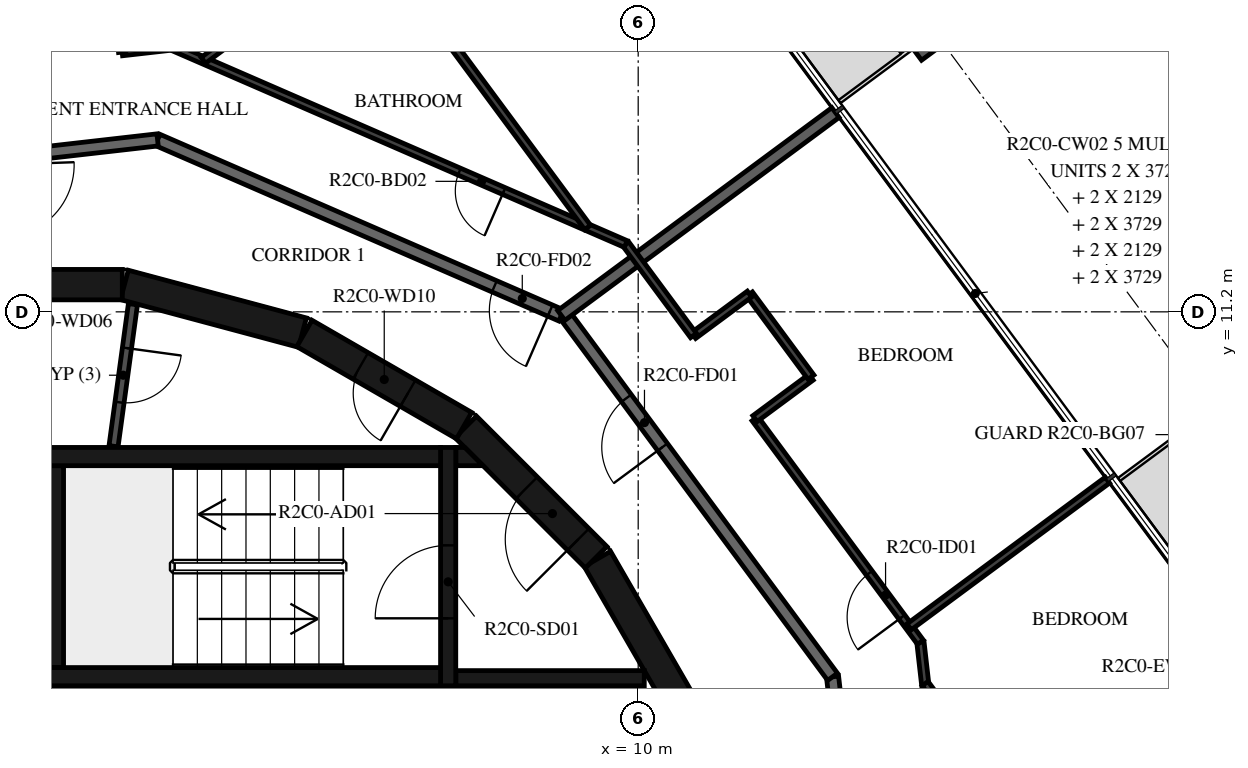
"""IFC4 building model, lengths in metres.
Left out: names, types, materials, properties, quantities, classifications, styles, units other than length and angle.
Written with IfcOpenShell. Run it as: python <this file> out.ifc"""

import sys

from ifc_helpers import new_model, si_unit, direction, frame, frame_2d, origin, origin_2d, place, context, subcontext, project, spatial, polyline, rectangle, i_section, outline, extrude, element, fill, save


model = new_model("IFC4")
c1 = context("Model", 3, precision=1e-05, world=origin(), true_north=direction((0.0, 1.0)))
c2 = subcontext(c1, "Body", "Model", "MODEL_VIEW")
j1 = project(units=[si_unit("LENGTHUNIT", "METRE"), si_unit("PLANEANGLEUNIT", "RADIAN")], contexts=[c1])
p1 = place(None, origin())
s1 = spatial("IfcSite", under=j1, at=p1, CompositionType="ELEMENT")
p2 = place(p1, origin())
s2 = spatial("IfcBuilding", under=s1, at=p2, CompositionType="ELEMENT")
p3 = place(p2, frame((0.0, 0.0, 104.7)))
s3 = spatial("IfcBuildingStorey", under=s2, at=p3, CompositionType="ELEMENT", Elevation=104.7)
p4 = place(p3, frame((14.932, 15.726, -0.38), z_axis=(0.0, 0.0, 1.0), x_axis=(0.594822857897, -0.803856807972, 0.0)))
e1 = element("IfcColumn", 1, at=p4, inside=s3, PredefinedType="COLUMN", context=c2, shape_type="SweptSolid", body=[
    extrude(i_section(OverallWidth=0.3, OverallDepth=0.9, WebThickness=0.019, FlangeThickness=0.035, FilletRadius=0.03, at=origin_2d()), origin(), (0.0, 0.0, 1.0), 2.616),
])
p5 = place(p3, frame((10.845, 4.51, 0.0), z_axis=(0.0, 0.0, 1.0), x_axis=(-0.500087131594, 0.865975092491, 0.0)))
e2 = element("IfcWall", 2, at=p5, inside=s3, PredefinedType="SHEAR", context=c2, shape_type="SweptSolid", body=[
    extrude(rectangle(XDim=3.033, YDim=0.5, at=frame_2d((1.516, 0.0))), origin(), (0.0, 0.0, 1.0), 3.05),
])
p6 = place(p3, frame((9.308, 7.164, 0.0), z_axis=(0.0, 0.0, 1.0), x_axis=(-0.707106781187, 0.707106781187, 0.0)))
e3 = element("IfcWall", 3, at=p6, inside=s3, PredefinedType="SHEAR", context=c2, shape_type="SweptSolid", body=[
    extrude(rectangle(XDim=3.032, YDim=0.5, at=frame_2d((1.516, 0.0))), origin(), (0.0, 0.0, 1.0), 3.05),
])
p7 = place(p6, frame((0.416, 0.0, 0.0)))
e4 = element("IfcOpeningElement", 4, at=p7, cuts=e3, PredefinedType="OPENING", context=c2, shape_type="SweptSolid", body=[
    extrude(rectangle(XDim=1.2, YDim=2.1, at=frame_2d((0.6, 1.05))), frame((0.0, 0.26, 0.0), z_axis=(0.0, -1.0, 0.0), x_axis=(1.0, 0.0, 0.0)), (0.0, 0.0, 1.0), 0.52),
])
p8 = place(p3, frame((7.137, 9.329, 0.0), z_axis=(0.0, 0.0, 1.0), x_axis=(-0.865975092491, 0.500087131594, 0.0)))
e5 = element("IfcWall", 5, at=p8, inside=s3, PredefinedType="SHEAR", context=c2, shape_type="SweptSolid", body=[
    extrude(rectangle(XDim=3.033, YDim=0.5, at=frame_2d((1.516, 0.0))), origin(), (0.0, 0.0, 1.0), 3.05),
])
p9 = place(p8, frame((1.066, 0.0, 0.0)))
e6 = element("IfcOpeningElement", 6, at=p9, cuts=e5, PredefinedType="OPENING", context=c2, shape_type="SweptSolid", body=[
    extrude(rectangle(XDim=0.9, YDim=2.1, at=frame_2d((0.45, 1.05))), frame((0.0, 0.26, 0.0), z_axis=(0.0, -1.0, 0.0), x_axis=(1.0, 0.0, 0.0)), (0.0, 0.0, 1.0), 0.52),
])
for number, where, z_axis, x_axis in (
    (7, (4.479, 10.858, 0.0), (0.0, 0.0, 1.0), (-0.966, 0.259, 0.0)),
    (8, (1.516, 11.647, 0.0), (0.0, 0.0, 1.0), (-1.0, 0.0, 0.0)),
):
    element("IfcWall", number, at=place(p3, frame(where, z_axis=z_axis, x_axis=x_axis)), inside=s3, PredefinedType="SHEAR", context=c2, shape_type="SweptSolid", body=[
        extrude(rectangle(XDim=3.033, YDim=0.5, at=frame_2d((1.516, 0.0))), origin(), (0.0, 0.0, 1.0), 3.05),
    ])
for number, where, z_axis, x_axis in (
    (9, (0.0, 5.2, 0.0), (0.0, 0.0, 1.0), (1.0, 0.0, 0.0)),
    (10, (0.0, 8.82, 0.0), (0.0, 0.0, 1.0), (1.0, 0.0, 0.0)),
):
    element("IfcWall", number, at=place(p3, frame(where, z_axis=z_axis, x_axis=x_axis)), inside=s3, PredefinedType="SHEAR", context=c2, shape_type="SweptSolid", body=[
        extrude(rectangle(XDim=6.75, YDim=0.3, at=frame_2d((3.375, 0.0))), origin(), (0.0, 0.0, 1.0), 3.05),
    ])
p10 = place(p3, frame((0.4, 5.35, 0.0), z_axis=(0.0, 0.0, 1.0), x_axis=(0.0, 1.0, 0.0)))
e11 = element("IfcWall", 11, at=p10, inside=s3, PredefinedType="SHEAR", context=c2, shape_type="SweptSolid", body=[
    extrude(rectangle(XDim=3.32, YDim=0.3, at=frame_2d((1.66, 0.0))), origin(), (0.0, 0.0, 1.0), 3.05),
])
p11 = place(p3, frame((6.875, 5.05, 0.0), z_axis=(0.0, 0.0, 1.0), x_axis=(0.0, 1.0, 0.0)))
e12 = element("IfcWall", 12, at=p11, inside=s3, PredefinedType="SHEAR", context=c2, shape_type="SweptSolid", body=[
    extrude(rectangle(XDim=3.92, YDim=0.25, at=frame_2d((1.96, 0.0))), origin(), (0.0, 0.0, 1.0), 3.05),
])
p12 = place(p11, frame((1.11, 0.0, 0.0)))
e13 = element("IfcOpeningElement", 13, at=p12, cuts=e12, PredefinedType="OPENING", context=c2, shape_type="SweptSolid", body=[
    extrude(rectangle(XDim=1.2, YDim=2.1, at=frame_2d((0.6, 1.05))), frame((0.0, 0.135, 0.0), z_axis=(0.0, -1.0, 0.0), x_axis=(1.0, 0.0, 0.0)), (0.0, 0.0, 1.0), 0.27),
])
p13 = place(p3, frame((7.0, 5.175, 0.0), z_axis=(0.0, 0.0, 1.0), x_axis=(1.0, 0.0, 0.0)))
e14 = element("IfcWall", 14, at=p13, inside=s3, PredefinedType="SHEAR", context=c2, shape_type="SweptSolid", body=[
    extrude(rectangle(XDim=3.1, YDim=0.25, at=frame_2d((1.55, 0.0))), origin(), (0.0, 0.0, 1.0), 3.05),
])
p14 = place(p3, origin())
e15 = element("IfcWall", 15, at=p14, inside=s3, PredefinedType="SHEAR", context=c2, shape_type="SweptSolid", body=[
    extrude(outline(polyline([(7.448, 8.67), (7.0, 8.67), (7.0, 8.97), (7.148, 8.97), (7.448, 8.67)])), origin(), (0.0, 0.0, 1.0), 3.05),
])
p15 = place(p3, origin())
e16 = element("IfcWall", 16, at=p15, inside=s3, PredefinedType="SHEAR", context=c2, shape_type="SweptSolid", body=[
    extrude(outline(polyline([(-9.55, 4.8), (-7.65, 4.8), (-7.65, 1.9), (-7.4, 1.9), (-7.4, 4.8), (-5.5, 4.8), (-5.5, 1.9), (-5.25, 1.9), (-5.25, 4.8), (-3.35, 4.8), (-3.35, 1.9), (-3.1, 1.9), (-3.1, 4.8), (-1.2, 4.8), (-1.2, 1.9), (-0.95, 1.9), (-0.95, 4.8), (0.95, 4.8), (0.95, 1.9), (1.2, 1.9), (1.2, 4.8), (3.1, 4.8), (3.1, 1.9), (3.35, 1.9), (3.35, 4.8), (5.25, 4.8), (5.25, 1.9), (5.5, 1.9), (5.5, 4.8), (7.4, 4.8), (7.4, 1.9), (7.65, 1.9), (7.65, 4.8), (9.55, 4.8), (9.55, 1.9), (9.8, 1.9), (9.8, 4.8), (9.8, 5.05), (-9.8, 5.05), (-9.8, 4.8), (-9.8, 1.9), (-9.55, 1.9), (-9.55, 4.8)])), origin(), (0.0, 0.0, 1.0), 3.05),
])
p16 = place(p3, frame((1.691, 11.326, 0.0), z_axis=(0.0, 0.0, 1.0), x_axis=(-0.135344253201, -0.990798633994, 0.0)))
e17 = element("IfcWall", 17, at=p16, inside=s3, PredefinedType="PARTITIONING", context=c2, shape_type="SweptSolid", body=[
    extrude(rectangle(XDim=2.358, YDim=0.15, at=frame_2d((1.179, 0.0))), origin(), (0.0, 0.0, 1.0), 3.05),
])
p17 = place(p16, frame((0.729, 0.0, 0.0)))
e18 = element("IfcOpeningElement", 18, at=p17, cuts=e17, PredefinedType="OPENING", context=c2, shape_type="SweptSolid", body=[
    extrude(rectangle(XDim=0.9, YDim=2.1, at=frame_2d((0.45, 1.05))), frame((0.0, 0.085, 0.0), z_axis=(0.0, -1.0, 0.0), x_axis=(1.0, 0.0, 0.0)), (0.0, 0.0, 1.0), 0.17),
])
p18 = place(p3, frame((14.028, -2.096, 0.0), z_axis=(0.0, 0.0, 1.0), x_axis=(-0.113226782163, 0.993569170114, 0.0)))
e19 = element("IfcWall", 19, at=p18, inside=s3, PredefinedType="STANDARD", context=c2, shape_type="SweptSolid", body=[
    extrude(rectangle(XDim=7.342, YDim=0.2, at=frame_2d((3.671, 0.0))), origin(), (0.0, 0.0, 1.0), 3.05),
])
p19 = place(p3, frame((13.196, 5.198, 0.0), z_axis=(0.0, 0.0, 1.0), x_axis=(-0.594805187394, 0.803869883159, 0.0)))
e20 = element("IfcWall", 20, at=p19, inside=s3, PredefinedType="STANDARD", context=c2, shape_type="SweptSolid", body=[
    extrude(rectangle(XDim=7.342, YDim=0.2, at=frame_2d((3.671, 0.0))), origin(), (0.0, 0.0, 1.0), 3.05),
])
p20 = place(p19, frame((4.7, 0.0, 0.0)))
e21 = element("IfcOpeningElement", 21, at=p20, cuts=e20, PredefinedType="OPENING", context=c2, shape_type="SweptSolid", body=[
    extrude(rectangle(XDim=1.0, YDim=2.1, at=frame_2d((0.5, 1.05))), frame((0.0, 0.11, 0.0), z_axis=(0.0, -1.0, 0.0), x_axis=(1.0, 0.0, 0.0)), (0.0, 0.0, 1.0), 0.22),
])
p21 = place(p3, frame((8.736, 11.141, 0.0), z_axis=(0.0, 0.0, 1.0), x_axis=(-0.917051290697, 0.398769269416, 0.0)))
e22 = element("IfcWall", 22, at=p21, inside=s3, PredefinedType="STANDARD", context=c2, shape_type="SweptSolid", body=[
    extrude(rectangle(XDim=7.24, YDim=0.2, at=frame_2d((3.62, 0.0))), origin(), (0.0, 0.0, 1.0), 3.05),
])
p22 = place(p21, frame((0.2, 0.0, 0.0)))
e23 = element("IfcOpeningElement", 23, at=p22, cuts=e22, PredefinedType="OPENING", context=c2, shape_type="SweptSolid", body=[
    extrude(rectangle(XDim=1.0, YDim=2.1, at=frame_2d((0.5, 1.05))), frame((0.0, 0.11, 0.0), z_axis=(0.0, -1.0, 0.0), x_axis=(1.0, 0.0, 0.0)), (0.0, 0.0, 1.0), 0.22),
])
p23 = place(p3, frame((2.096, 14.028, 0.0), z_axis=(0.0, 0.0, 1.0), x_axis=(-0.993569170114, -0.113226782163, 0.0)))
e24 = element("IfcWall", 24, at=p23, inside=s3, PredefinedType="STANDARD", context=c2, shape_type="SweptSolid", body=[
    extrude(rectangle(XDim=7.342, YDim=0.2, at=frame_2d((3.671, 0.0))), origin(), (0.0, 0.0, 1.0), 3.05),
])
p24 = place(p3, frame((13.244, 14.477, 0.0), z_axis=(0.0, 0.0, 1.0), x_axis=(-0.803853971109, -0.594826691677, 0.0)))
e25 = element("IfcWall", 25, at=p24, inside=s3, PredefinedType="STANDARD", context=c2, shape_type="SweptSolid", body=[
    extrude(rectangle(XDim=5.609, YDim=0.2, at=frame_2d((2.804, 0.0))), origin(), (0.0, 0.0, 1.0), 3.05),
])
p25 = place(p3, frame((15.563, -2.326, 0.0), z_axis=(0.0, 0.0, 1.0), x_axis=(-0.11320423706, 0.993571739087, 0.0)))
e26 = element("IfcWall", 26, at=p25, inside=s3, PredefinedType="PARTITIONING", context=c2, shape_type="SweptSolid", body=[
    extrude(rectangle(XDim=8.146, YDim=0.12, at=frame_2d((4.073, 0.0))), origin(), (0.0, 0.0, 1.0), 3.05),
])
p26 = place(p25, frame((0.97, 0.0, 0.0)))
e27 = element("IfcOpeningElement", 27, at=p26, cuts=e26, PredefinedType="OPENING", context=c2, shape_type="SweptSolid", body=[
    extrude(rectangle(XDim=0.8, YDim=2.1, at=frame_2d((0.4, 1.05))), frame((0.0, 0.07, 0.0), z_axis=(0.0, -1.0, 0.0), x_axis=(1.0, 0.0, 0.0)), (0.0, 0.0, 1.0), 0.14),
])
p27 = place(p3, frame((14.641, 5.767, 0.0), z_axis=(0.0, 0.0, 1.0), x_axis=(-0.594785744505, 0.803884269117, 0.0)))
e28 = element("IfcWall", 28, at=p27, inside=s3, PredefinedType="PARTITIONING", context=c2, shape_type="SweptSolid", body=[
    extrude(rectangle(XDim=4.573, YDim=0.12, at=frame_2d((2.287, 0.0))), origin(), (0.0, 0.0, 1.0), 3.05),
])
p28 = place(p27, frame((0.513, 0.0, 0.0)))
e29 = element("IfcOpeningElement", 29, at=p28, cuts=e28, PredefinedType="OPENING", context=c2, shape_type="SweptSolid", body=[
    extrude(rectangle(XDim=0.9, YDim=2.1, at=frame_2d((0.45, 1.05))), frame((0.0, 0.07, 0.0), z_axis=(0.0, -1.0, 0.0), x_axis=(1.0, 0.0, 0.0)), (0.0, 0.0, 1.0), 0.14),
])
p29 = place(p3, frame((11.921, 9.444, 0.0), z_axis=(0.0, 0.0, 1.0), x_axis=(0.803768532163, 0.594942137274, 0.0)))
e30 = element("IfcWall", 30, at=p29, inside=s3, PredefinedType="PARTITIONING", context=c2, shape_type="SweptSolid", body=[
    extrude(rectangle(XDim=1.146, YDim=0.12, at=frame_2d((0.573, 0.0))), origin(), (0.0, 0.0, 1.0), 3.05),
])
p30 = place(p3, frame((12.842, 10.125, 0.0), z_axis=(0.0, 0.0, 1.0), x_axis=(-0.594770612735, 0.803895464738, 0.0)))
e31 = element("IfcWall", 31, at=p30, inside=s3, PredefinedType="PARTITIONING", context=c2, shape_type="SweptSolid", body=[
    extrude(rectangle(XDim=1.7, YDim=0.12, at=frame_2d((0.85, 0.0))), origin(), (0.0, 0.0, 1.0), 3.05),
])
p31 = place(p3, frame((11.831, 11.492, 0.0), z_axis=(0.0, 0.0, 1.0), x_axis=(-0.803843936653, -0.59484025209, 0.0)))
e32 = element("IfcWall", 32, at=p31, inside=s3, PredefinedType="PARTITIONING", context=c2, shape_type="SweptSolid", body=[
    extrude(rectangle(XDim=1.146, YDim=0.12, at=frame_2d((0.573, 0.0))), origin(), (0.0, 0.0, 1.0), 3.05),
])
p32 = place(p3, frame((10.91, 10.81, 0.0), z_axis=(0.0, 0.0, 1.0), x_axis=(-0.59489693125, 0.803801991282, 0.0)))
e33 = element("IfcWall", 33, at=p32, inside=s3, PredefinedType="PARTITIONING", context=c2, shape_type="SweptSolid", body=[
    extrude(rectangle(XDim=1.872, YDim=0.12, at=frame_2d((0.936, 0.0))), origin(), (0.0, 0.0, 1.0), 3.05),
])
p33 = place(p3, frame((21.842, -4.54, 0.0), z_axis=(0.0, 0.0, 1.0), x_axis=(-0.59481744951, 0.803860809941, 0.0)))
e34 = element("IfcWall", 34, at=p33, inside=s3, PredefinedType="PARTITIONING", context=c2, shape_type="SweptSolid", body=[
    extrude(rectangle(XDim=11.976, YDim=0.12, at=frame_2d((5.988, 0.0))), origin(), (0.0, 0.0, 1.0), 3.05),
])
p34 = place(p33, frame((0.6, 0.0, 0.0)))
e35 = element("IfcOpeningElement", 35, at=p34, cuts=e34, PredefinedType="OPENING", context=c2, shape_type="SweptSolid", body=[
    extrude(rectangle(XDim=0.9, YDim=2.1, at=frame_2d((0.45, 1.05))), frame((0.0, 0.07, 0.0), z_axis=(0.0, -1.0, 0.0), x_axis=(1.0, 0.0, 0.0)), (0.0, 0.0, 1.0), 0.14),
])
p35 = place(p3, frame((17.717, 8.433, 0.0), z_axis=(0.0, 0.0, 1.0), x_axis=(-0.803853407146, -0.594827453821, 0.0)))
e36 = element("IfcWall", 36, at=p35, inside=s3, PredefinedType="PARTITIONING", context=c2, shape_type="SweptSolid", body=[
    extrude(rectangle(XDim=4.058, YDim=0.12, at=frame_2d((2.029, 0.0))), origin(), (0.0, 0.0, 1.0), 3.05),
])
p36 = place(p3, frame((9.796, 12.315, 0.0), z_axis=(0.0, 0.0, 1.0), x_axis=(-0.917059572812, 0.398750222463, 0.0)))
e37 = element("IfcWall", 37, at=p36, inside=s3, PredefinedType="PARTITIONING", context=c2, shape_type="SweptSolid", body=[
    extrude(rectangle(XDim=8.146, YDim=0.12, at=frame_2d((4.073, 0.0))), origin(), (0.0, 0.0, 1.0), 3.05),
])
p37 = place(p36, frame((2.185, 0.0, 0.0)))
e38 = element("IfcOpeningElement", 38, at=p37, cuts=e37, PredefinedType="OPENING", context=c2, shape_type="SweptSolid", body=[
    extrude(rectangle(XDim=0.8, YDim=2.1, at=frame_2d((0.4, 1.05))), frame((0.0, 0.07, 0.0), z_axis=(0.0, -1.0, 0.0), x_axis=(1.0, 0.0, 0.0)), (0.0, 0.0, 1.0), 0.14),
])
p38 = place(p3, frame((2.326, 15.563, 0.0), z_axis=(0.0, 0.0, 1.0), x_axis=(-0.993570169982, -0.113218007944, 0.0)))
e39 = element("IfcWall", 39, at=p38, inside=s3, PredefinedType="PARTITIONING", context=c2, shape_type="SweptSolid", body=[
    extrude(rectangle(XDim=0.817, YDim=0.12, at=frame_2d((0.409, 0.0))), origin(), (0.0, 0.0, 1.0), 3.05),
])
p39 = place(p3, frame((1.514, 15.471, 0.0), z_axis=(0.0, 0.0, 1.0), x_axis=(-0.113301814952, 0.993560616535, 0.0)))
e40 = element("IfcWall", 40, at=p39, inside=s3, PredefinedType="PARTITIONING", context=c2, shape_type="SweptSolid", body=[
    extrude(rectangle(XDim=2.053, YDim=0.12, at=frame_2d((1.027, 0.0))), origin(), (0.0, 0.0, 1.0), 3.05),
])
p40 = place(p39, frame((0.2, 0.0, 0.0)))
e41 = element("IfcOpeningElement", 41, at=p40, cuts=e40, PredefinedType="OPENING", context=c2, shape_type="SweptSolid", body=[
    extrude(rectangle(XDim=0.9, YDim=2.1, at=frame_2d((0.45, 1.05))), frame((0.0, 0.07, 0.0), z_axis=(0.0, -1.0, 0.0), x_axis=(1.0, 0.0, 0.0)), (0.0, 0.0, 1.0), 0.14),
])
p41 = place(p3, frame((0.498, 24.306, 0.0), z_axis=(0.0, 0.0, 1.0), x_axis=(0.594826122019, -0.803854392639, 0.0)))
e42 = element("IfcWall", 42, at=p41, inside=s3, PredefinedType="PARTITIONING", context=c2, shape_type="SweptSolid", body=[
    extrude(rectangle(XDim=14.576, YDim=0.12, at=frame_2d((7.288, 0.0))), origin(), (0.0, 0.0, 1.0), 3.05),
])
p42 = place(p41, frame((2.841, 0.0, 0.0)))
e43 = element("IfcOpeningElement", 43, at=p42, cuts=e42, PredefinedType="OPENING", context=c2, shape_type="SweptSolid", body=[
    extrude(rectangle(XDim=0.9, YDim=2.1, at=frame_2d((0.45, 1.05))), frame((0.0, 0.07, 0.0), z_axis=(0.0, -1.0, 0.0), x_axis=(1.0, 0.0, 0.0)), (0.0, 0.0, 1.0), 0.14),
])
p43 = place(p41, frame((0.605, 0.0, 0.0)))
e44 = element("IfcOpeningElement", 44, at=p43, cuts=e42, PredefinedType="OPENING", context=c2, shape_type="SweptSolid", body=[
    extrude(rectangle(XDim=0.9, YDim=2.1, at=frame_2d((0.45, 1.05))), frame((0.0, 0.07, 0.0), z_axis=(0.0, -1.0, 0.0), x_axis=(1.0, 0.0, 0.0)), (0.0, 0.0, 1.0), 0.14),
])
p44 = place(p3, frame((5.618, 17.386, 0.0), z_axis=(0.0, 0.0, 1.0), x_axis=(-0.803852063114, -0.59482927015, 0.0)))
e45 = element("IfcWall", 45, at=p44, inside=s3, PredefinedType="PARTITIONING", context=c2, shape_type="SweptSolid", body=[
    extrude(rectangle(XDim=3.446, YDim=0.12, at=frame_2d((1.723, 0.0))), origin(), (0.0, 0.0, 1.0), 3.05),
])
p45 = place(p12, origin())
e46 = element("IfcDoor", 46, at=p45, inside=s3, OperationType="SINGLE_SWING_LEFT", PredefinedType="DOOR", context=c2, shape_type="SweptSolid", body=[
    extrude(rectangle(XDim=1.2, YDim=2.1, at=frame_2d((0.6, 1.05))), frame((0.0, 0.025, 0.0), z_axis=(0.0, -1.0, 0.0), x_axis=(1.0, 0.0, 0.0)), (0.0, 0.0, 1.0), 0.05),
])
fill(e13, e46)
p46 = place(p7, origin())
e47 = element("IfcDoor", 47, at=p46, inside=s3, OperationType="SINGLE_SWING_RIGHT", PredefinedType="DOOR", context=c2, shape_type="SweptSolid", body=[
    extrude(rectangle(XDim=1.2, YDim=2.1, at=frame_2d((0.6, 1.05))), frame((0.0, 0.025, 0.0), z_axis=(0.0, -1.0, 0.0), x_axis=(1.0, 0.0, 0.0)), (0.0, 0.0, 1.0), 0.05),
])
fill(e4, e47)
p47 = place(p17, origin())
e48 = element("IfcDoor", 48, at=p47, inside=s3, OperationType="SINGLE_SWING_LEFT", PredefinedType="DOOR", context=c2, shape_type="SweptSolid", body=[
    extrude(rectangle(XDim=0.9, YDim=2.1, at=frame_2d((0.45, 1.05))), frame((0.0, 0.025, 0.0), z_axis=(0.0, -1.0, 0.0), x_axis=(1.0, 0.0, 0.0)), (0.0, 0.0, 1.0), 0.05),
])
fill(e18, e48)
p48 = place(p9, origin())
e49 = element("IfcDoor", 49, at=p48, inside=s3, OperationType="SINGLE_SWING_LEFT", PredefinedType="DOOR", context=c2, shape_type="SweptSolid", body=[
    extrude(rectangle(XDim=0.9, YDim=2.1, at=frame_2d((0.45, 1.05))), frame((0.0, 0.025, 0.0), z_axis=(0.0, -1.0, 0.0), x_axis=(1.0, 0.0, 0.0)), (0.0, 0.0, 1.0), 0.05),
])
fill(e6, e49)
p49 = place(p20, origin())
e50 = element("IfcDoor", 50, at=p49, inside=s3, OperationType="SINGLE_SWING_RIGHT", PredefinedType="DOOR", context=c2, shape_type="SweptSolid", body=[
    extrude(rectangle(XDim=1.0, YDim=2.1, at=frame_2d((0.5, 1.05))), frame((0.0, 0.025, 0.0), z_axis=(0.0, -1.0, 0.0), x_axis=(1.0, 0.0, 0.0)), (0.0, 0.0, 1.0), 0.05),
])
fill(e21, e50)
p50 = place(p28, origin())
e51 = element("IfcDoor", 51, at=p50, inside=s3, OperationType="SINGLE_SWING_LEFT", PredefinedType="DOOR", context=c2, shape_type="SweptSolid", body=[
    extrude(rectangle(XDim=0.9, YDim=2.1, at=frame_2d((0.45, 1.05))), frame((0.0, 0.025, 0.0), z_axis=(0.0, -1.0, 0.0), x_axis=(1.0, 0.0, 0.0)), (0.0, 0.0, 1.0), 0.05),
])
fill(e29, e51)
p51 = place(p22, origin())
e52 = element("IfcDoor", 52, at=p51, inside=s3, OperationType="SINGLE_SWING_RIGHT", PredefinedType="DOOR", context=c2, shape_type="SweptSolid", body=[
    extrude(rectangle(XDim=1.0, YDim=2.1, at=frame_2d((0.5, 1.05))), frame((0.0, 0.025, 0.0), z_axis=(0.0, -1.0, 0.0), x_axis=(1.0, 0.0, 0.0)), (0.0, 0.0, 1.0), 0.05),
])
fill(e23, e52)
p52 = place(p37, origin())
e53 = element("IfcDoor", 53, at=p52, inside=s3, OperationType="SINGLE_SWING_RIGHT", PredefinedType="DOOR", context=c2, shape_type="SweptSolid", body=[
    extrude(rectangle(XDim=0.8, YDim=2.1, at=frame_2d((0.4, 1.05))), frame((0.0, 0.025, 0.0), z_axis=(0.0, -1.0, 0.0), x_axis=(1.0, 0.0, 0.0)), (0.0, 0.0, 1.0), 0.05),
])
fill(e38, e53)
save(model, sys.argv[1])
